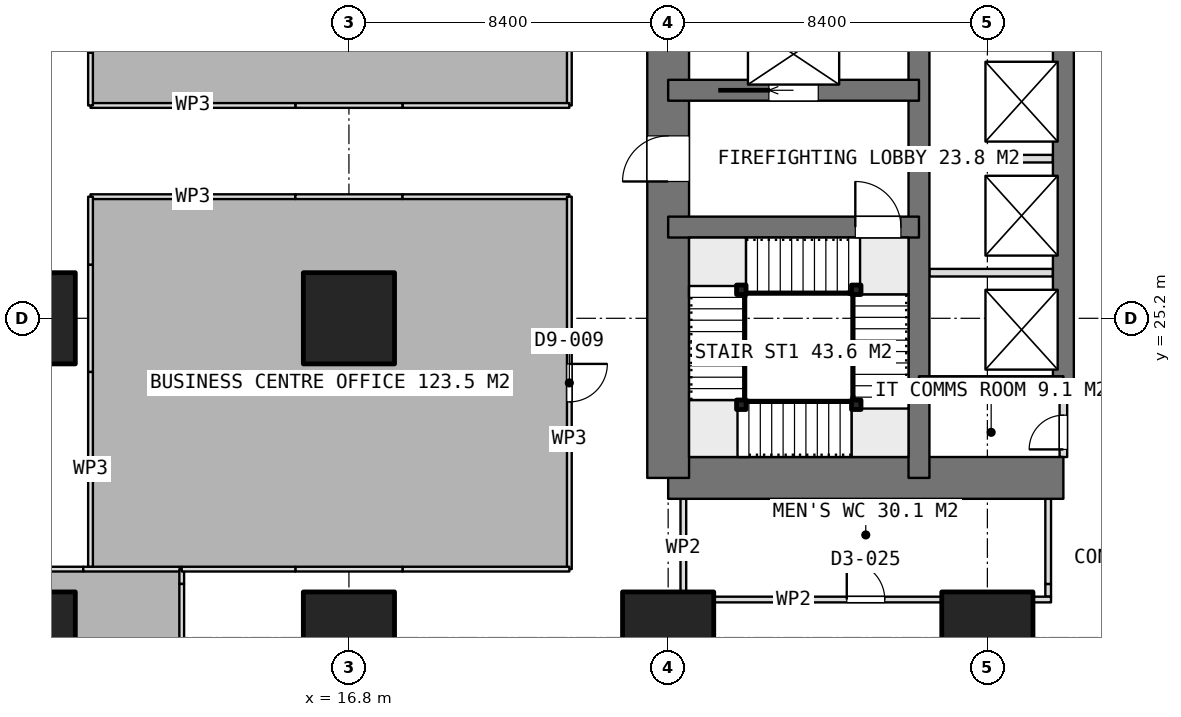
"""IFC4 building model, lengths in metres.
Left out: names, types, materials, properties, quantities, classifications, styles, units other than length and angle.
Written with IfcOpenShell. Run it as: python <this file> out.ifc"""

import sys

from ifc_helpers import new_model, si_unit, direction, frame, frame_2d, origin, origin_2d, place, context, subcontext, project, spatial, rectangle, extrude, element, fill, save


model = new_model("IFC4")
c1 = context("Model", 3, precision=1e-05, world=origin(), true_north=direction((0.0, 1.0)))
c2 = subcontext(c1, "Body", "Model", "MODEL_VIEW")
j1 = project(units=[si_unit("LENGTHUNIT", "METRE"), si_unit("PLANEANGLEUNIT", "RADIAN")], contexts=[c1])
p1 = place(None, origin())
s1 = spatial("IfcSite", under=j1, at=p1, CompositionType="ELEMENT")
p2 = place(p1, origin())
s2 = spatial("IfcBuilding", under=s1, at=p2, CompositionType="ELEMENT")
p3 = place(p2, frame((0.0, 0.0, 20.4)))
s3 = spatial("IfcBuildingStorey", under=s2, at=p3, CompositionType="ELEMENT", Elevation=20.4)
p4 = place(p3, frame((25.2, 21.0, 0.0), z_axis=(0.0, 0.0, 1.0), x_axis=(1.0, 0.0, 0.0)))
e1 = element("IfcWall", 1, at=p4, inside=s3, PredefinedType="SHEAR", context=c2, shape_type="SweptSolid", body=[
    extrude(rectangle(XDim=10.4, YDim=1.1, at=frame_2d((5.2, 0.0))), origin(), (0.0, 0.0, 1.0), 5.0),
])
p5 = place(p3, frame((25.2, 21.0, 0.0), z_axis=(0.0, 0.0, 1.0), x_axis=(0.0, 1.0, 0.0)))
e2 = element("IfcWall", 2, at=p5, inside=s3, PredefinedType="SHEAR", context=c2, shape_type="SweptSolid", body=[
    extrude(rectangle(XDim=25.2, YDim=1.1, at=frame_2d((12.6, 0.0))), origin(), (0.0, 0.0, 1.0), 5.0),
])
p6 = place(p5, frame((7.8, 0.0, 0.0)))
e3 = element("IfcOpeningElement", 3, at=p6, cuts=e2, PredefinedType="OPENING", context=c2, shape_type="SweptSolid", body=[
    extrude(rectangle(XDim=1.2, YDim=2.1, at=frame_2d((0.6, 1.05))), frame((0.0, 0.56, 0.0), z_axis=(0.0, -1.0, 0.0), x_axis=(1.0, 0.0, 0.0)), (0.0, 0.0, 1.0), 1.12),
])
p7 = place(p5, frame((14.25, 0.0, 0.0)))
e4 = element("IfcOpeningElement", 4, at=p7, cuts=e2, PredefinedType="OPENING", context=c2, shape_type="SweptSolid", body=[
    extrude(rectangle(XDim=0.9, YDim=2.1, at=frame_2d((0.45, 1.05))), frame((0.0, 0.56, 0.0), z_axis=(0.0, -1.0, 0.0), x_axis=(1.0, 0.0, 0.0)), (0.0, 0.0, 1.0), 1.12),
])
p8 = place(p5, frame((16.85, 0.0, 0.0)))
e5 = element("IfcOpeningElement", 5, at=p8, cuts=e2, PredefinedType="OPENING", context=c2, shape_type="SweptSolid", body=[
    extrude(rectangle(XDim=0.9, YDim=2.1, at=frame_2d((0.45, 1.05))), frame((0.0, 0.56, 0.0), z_axis=(0.0, -1.0, 0.0), x_axis=(1.0, 0.0, 0.0)), (0.0, 0.0, 1.0), 1.12),
])
p9 = place(p5, frame((19.075, 0.0, 0.0)))
e6 = element("IfcOpeningElement", 6, at=p9, cuts=e2, PredefinedType="OPENING", context=c2, shape_type="SweptSolid", body=[
    extrude(rectangle(XDim=1.2, YDim=2.1, at=frame_2d((0.6, 1.05))), frame((0.0, 0.56, 0.0), z_axis=(0.0, -1.0, 0.0), x_axis=(1.0, 0.0, 0.0)), (0.0, 0.0, 1.0), 1.12),
])
p10 = place(p3, frame((31.8, 21.0, 0.0), z_axis=(0.0, 0.0, 1.0), x_axis=(0.0, 1.0, 0.0)))
e7 = element("IfcWall", 7, at=p10, inside=s3, PredefinedType="SHEAR", context=c2, shape_type="SweptSolid", body=[
    extrude(rectangle(XDim=25.2, YDim=0.55, at=frame_2d((12.6, 0.0))), origin(), (0.0, 0.0, 1.0), 5.0),
])
p11 = place(p3, frame((35.6, 23.4, 0.0), z_axis=(0.0, 0.0, 1.0), x_axis=(0.0, 1.0, 0.0)))
e8 = element("IfcWall", 8, at=p11, inside=s3, PredefinedType="SHEAR", context=c2, shape_type="SweptSolid", body=[
    extrude(rectangle(XDim=18.0, YDim=0.55, at=frame_2d((9.0, 0.0))), origin(), (0.0, 0.0, 1.0), 5.0),
])
p12 = place(p3, frame((31.8, 23.4, 0.0), z_axis=(0.0, 0.0, 1.0), x_axis=(1.0, 0.0, 0.0)))
e9 = element("IfcWall", 9, at=p12, inside=s3, PredefinedType="SHEAR", context=c2, shape_type="SweptSolid", body=[
    extrude(rectangle(XDim=3.8, YDim=0.55, at=frame_2d((1.9, 0.0))), origin(), (0.0, 0.0, 1.0), 5.0),
])
p13 = place(p3, frame((25.2, 27.6, 0.0), z_axis=(0.0, 0.0, 1.0), x_axis=(1.0, 0.0, 0.0)))
e10 = element("IfcWall", 10, at=p13, inside=s3, PredefinedType="SHEAR", context=c2, shape_type="SweptSolid", body=[
    extrude(rectangle(XDim=6.6, YDim=0.55, at=frame_2d((3.3, 0.0))), origin(), (0.0, 0.0, 1.0), 5.0),
])
p14 = place(p13, frame((4.925, 0.0, 0.0)))
e11 = element("IfcOpeningElement", 11, at=p14, cuts=e10, PredefinedType="OPENING", context=c2, shape_type="SweptSolid", body=[
    extrude(rectangle(XDim=1.2, YDim=2.1, at=frame_2d((0.6, 1.05))), frame((0.0, 0.285, 0.0), z_axis=(0.0, -1.0, 0.0), x_axis=(1.0, 0.0, 0.0)), (0.0, 0.0, 1.0), 0.57),
])
p15 = place(p3, frame((25.2, 31.2, 0.0), z_axis=(0.0, 0.0, 1.0), x_axis=(1.0, 0.0, 0.0)))
e12 = element("IfcWall", 12, at=p15, inside=s3, PredefinedType="SHEAR", context=c2, shape_type="SweptSolid", body=[
    extrude(rectangle(XDim=6.6, YDim=0.55, at=frame_2d((3.3, 0.0))), origin(), (0.0, 0.0, 1.0), 5.0),
])
p16 = place(p15, frame((2.65, 0.0, 0.0)))
e13 = element("IfcOpeningElement", 13, at=p16, cuts=e12, PredefinedType="OPENING", context=c2, shape_type="SweptSolid", body=[
    extrude(rectangle(XDim=1.3, YDim=2.1, at=frame_2d((0.65, 1.05))), frame((0.0, 0.285, 0.0), z_axis=(0.0, -1.0, 0.0), x_axis=(1.0, 0.0, 0.0)), (0.0, 0.0, 1.0), 0.57),
])
for number, where, z_axis, x_axis in (
    (14, (8.4, 16.8, 0.0), (0.0, 0.0, 1.0), (1.0, 0.0, 0.0)),
    (15, (8.4, 25.2, 0.0), (0.0, 0.0, 1.0), (1.0, 0.0, 0.0)),
    (16, (16.8, 16.8, 0.0), (0.0, 0.0, 1.0), (1.0, 0.0, 0.0)),
    (17, (16.8, 25.2, 0.0), (0.0, 0.0, 1.0), (1.0, 0.0, 0.0)),
    (18, (25.2, 16.8, 0.0), (0.0, 0.0, 1.0), (1.0, 0.0, 0.0)),
    (19, (33.6, 16.8, 0.0), (0.0, 0.0, 1.0), (1.0, 0.0, 0.0)),
):
    element("IfcColumn", number, at=place(p3, frame(where, z_axis=z_axis, x_axis=x_axis)), inside=s3, PredefinedType="COLUMN", context=c2, shape_type="SweptSolid", body=[
        extrude(rectangle(XDim=2.4, YDim=2.4, at=origin_2d()), origin(), (0.0, 0.0, 1.0), 5.0),
    ])
for number, where, z_axis, x_axis in (
    (20, (32.075, 26.4, 0.0), (0.0, 0.0, 1.0), (1.0, 0.0, 0.0)),
    (21, (32.075, 29.4, 0.0), (0.0, 0.0, 1.0), (1.0, 0.0, 0.0)),
):
    element("IfcWall", number, at=place(p3, frame(where, z_axis=z_axis, x_axis=x_axis)), inside=s3, PredefinedType="PARTITIONING", context=c2, shape_type="SweptSolid", body=[
        extrude(rectangle(XDim=3.25, YDim=0.2, at=frame_2d((1.625, 0.0))), origin(), (0.0, 0.0, 1.0), 4.6),
    ])
p17 = place(p3, frame((35.6, 21.55, 0.0), z_axis=(0.0, 0.0, 1.0), x_axis=(0.0, 1.0, 0.0)))
e22 = element("IfcWall", 22, at=p17, inside=s3, PredefinedType="PARTITIONING", context=c2, shape_type="SweptSolid", body=[
    extrude(rectangle(XDim=1.575, YDim=0.2, at=frame_2d((0.788, 0.0))), origin(), (0.0, 0.0, 1.0), 4.6),
])
p18 = place(p17, frame((0.2, 0.0, 0.0)))
e23 = element("IfcOpeningElement", 23, at=p18, cuts=e22, PredefinedType="OPENING", context=c2, shape_type="SweptSolid", body=[
    extrude(rectangle(XDim=0.9, YDim=2.1, at=frame_2d((0.45, 1.05))), frame((0.0, 0.11, 0.0), z_axis=(0.0, -1.0, 0.0), x_axis=(1.0, 0.0, 0.0)), (0.0, 0.0, 1.0), 0.22),
])
p19 = place(p3, frame((25.525, 17.8, 0.0), z_axis=(0.0, 0.0, 1.0), x_axis=(1.0, 0.0, 0.0)))
e24 = element("IfcWall", 24, at=p19, inside=s3, PredefinedType="PARTITIONING", context=c2, shape_type="SweptSolid", body=[
    extrude(rectangle(XDim=0.875, YDim=0.15, at=frame_2d((0.438, 0.0))), origin(), (0.0, 0.0, 1.0), 4.6),
])
p20 = place(p3, frame((26.4, 17.8, 0.0), z_axis=(0.0, 0.0, 1.0), x_axis=(1.0, 0.0, 0.0)))
e25 = element("IfcWall", 25, at=p20, inside=s3, PredefinedType="PARTITIONING", context=c2, shape_type="SweptSolid", body=[
    extrude(rectangle(XDim=6.0, YDim=0.15, at=frame_2d((3.0, 0.0))), origin(), (0.0, 0.0, 1.0), 2.8),
])
p21 = place(p20, frame((3.5, 0.0, 0.0)))
e26 = element("IfcOpeningElement", 26, at=p21, cuts=e25, PredefinedType="OPENING", context=c2, shape_type="SweptSolid", body=[
    extrude(rectangle(XDim=1.0, YDim=2.1, at=frame_2d((0.5, 1.05))), frame((0.0, 0.085, 0.0), z_axis=(0.0, -1.0, 0.0), x_axis=(1.0, 0.0, 0.0)), (0.0, 0.0, 1.0), 0.17),
])
p22 = place(p3, frame((32.4, 17.8, 0.0), z_axis=(0.0, 0.0, 1.0), x_axis=(1.0, 0.0, 0.0)))
e27 = element("IfcWall", 27, at=p22, inside=s3, PredefinedType="PARTITIONING", context=c2, shape_type="SweptSolid", body=[
    extrude(rectangle(XDim=2.4, YDim=0.15, at=frame_2d((1.2, 0.0))), origin(), (0.0, 0.0, 1.0), 4.6),
])
p23 = place(p3, frame((34.8, 17.8, 0.0), z_axis=(0.0, 0.0, 1.0), x_axis=(1.0, 0.0, 0.0)))
e28 = element("IfcWall", 28, at=p23, inside=s3, PredefinedType="PARTITIONING", context=c2, shape_type="SweptSolid", body=[
    extrude(rectangle(XDim=0.475, YDim=0.15, at=frame_2d((0.237, 0.0))), origin(), (0.0, 0.0, 1.0), 2.8),
])
p24 = place(p3, frame((25.6, 17.875, 0.0), z_axis=(0.0, 0.0, 1.0), x_axis=(0.0, 1.0, 0.0)))
e29 = element("IfcWall", 29, at=p24, inside=s3, PredefinedType="PARTITIONING", context=c2, shape_type="SweptSolid", body=[
    extrude(rectangle(XDim=2.575, YDim=0.15, at=frame_2d((1.288, 0.0))), origin(), (0.0, 0.0, 1.0), 4.6),
])
p25 = place(p3, frame((35.2, 17.875, 0.0), z_axis=(0.0, 0.0, 1.0), x_axis=(0.0, 1.0, 0.0)))
e30 = element("IfcWall", 30, at=p25, inside=s3, PredefinedType="PARTITIONING", context=c2, shape_type="SweptSolid", body=[
    extrude(rectangle(XDim=0.335, YDim=0.15, at=frame_2d((0.167, 0.0))), origin(), (0.0, 0.0, 1.0), 2.8),
])
p26 = place(p3, frame((35.2, 18.21, 0.0), z_axis=(0.0, 0.0, 1.0), x_axis=(0.0, 1.0, 0.0)))
e31 = element("IfcWall", 31, at=p26, inside=s3, PredefinedType="PARTITIONING", context=c2, shape_type="SweptSolid", body=[
    extrude(rectangle(XDim=2.24, YDim=0.15, at=frame_2d((1.12, 0.0))), origin(), (0.0, 0.0, 1.0), 4.6),
])
p27 = place(p3, frame((6.99, 18.6, 0.0), z_axis=(0.0, 0.0, 1.0), x_axis=(1.0, 0.0, 0.0)))
e32 = element("IfcWall", 32, at=p27, inside=s3, PredefinedType="PARTITIONING", context=c2, shape_type="SweptSolid", body=[
    extrude(rectangle(XDim=2.82, YDim=0.125, at=frame_2d((1.41, 0.0))), origin(), (0.0, 0.0, 1.0), 2.8),
])
p28 = place(p3, frame((9.81, 18.6, 0.0), z_axis=(0.0, 0.0, 1.0), x_axis=(1.0, 0.0, 0.0)))
e33 = element("IfcWall", 33, at=p28, inside=s3, PredefinedType="PARTITIONING", context=c2, shape_type="SweptSolid", body=[
    extrude(rectangle(XDim=2.59, YDim=0.125, at=frame_2d((1.295, 0.0))), origin(), (0.0, 0.0, 1.0), 4.6),
])
p29 = place(p3, frame((12.4, 18.6, 0.0), z_axis=(0.0, 0.0, 1.0), x_axis=(0.0, -1.0, 0.0)))
e34 = element("IfcWall", 34, at=p29, inside=s3, PredefinedType="PARTITIONING", context=c2, shape_type="SweptSolid", body=[
    extrude(rectangle(XDim=0.39, YDim=0.125, at=frame_2d((0.195, 0.0))), origin(), (0.0, 0.0, 1.0), 4.6),
])
p30 = place(p3, frame((12.4, 18.21, 0.0), z_axis=(0.0, 0.0, 1.0), x_axis=(0.0, -1.0, 0.0)))
e35 = element("IfcWall", 35, at=p30, inside=s3, PredefinedType="PARTITIONING", context=c2, shape_type="SweptSolid", body=[
    extrude(rectangle(XDim=2.82, YDim=0.125, at=frame_2d((1.41, 0.0))), origin(), (0.0, 0.0, 1.0), 2.8),
])
p31 = place(p3, frame((10.0, 28.4, 0.0), z_axis=(0.0, 0.0, 1.0), x_axis=(1.0, 0.0, 0.0)))
e36 = element("IfcWall", 36, at=p31, inside=s3, PredefinedType="PARTITIONING", context=c2, shape_type="SweptSolid", body=[
    extrude(rectangle(XDim=5.39, YDim=0.125, at=frame_2d((2.695, 0.0))), origin(), (0.0, 0.0, 1.0), 4.6),
])
p32 = place(p3, frame((15.39, 28.4, 0.0), z_axis=(0.0, 0.0, 1.0), x_axis=(1.0, 0.0, 0.0)))
e37 = element("IfcWall", 37, at=p32, inside=s3, PredefinedType="PARTITIONING", context=c2, shape_type="SweptSolid", body=[
    extrude(rectangle(XDim=2.82, YDim=0.125, at=frame_2d((1.41, 0.0))), origin(), (0.0, 0.0, 1.0), 2.8),
])
p33 = place(p3, frame((18.21, 28.4, 0.0), z_axis=(0.0, 0.0, 1.0), x_axis=(1.0, 0.0, 0.0)))
e38 = element("IfcWall", 38, at=p33, inside=s3, PredefinedType="PARTITIONING", context=c2, shape_type="SweptSolid", body=[
    extrude(rectangle(XDim=4.39, YDim=0.125, at=frame_2d((2.195, 0.0))), origin(), (0.0, 0.0, 1.0), 4.6),
])
p34 = place(p3, frame((22.6, 28.4, 0.0), z_axis=(0.0, 0.0, 1.0), x_axis=(0.0, -1.0, 0.0)))
e39 = element("IfcWall", 39, at=p34, inside=s3, PredefinedType="PARTITIONING", context=c2, shape_type="SweptSolid", body=[
    extrude(rectangle(XDim=9.8, YDim=0.125, at=frame_2d((4.9, 0.0))), origin(), (0.0, 0.0, 1.0), 4.6),
])
p35 = place(p34, frame((4.4, 0.0, 0.0)))
e40 = element("IfcOpeningElement", 40, at=p35, cuts=e39, PredefinedType="OPENING", context=c2, shape_type="SweptSolid", body=[
    extrude(rectangle(XDim=1.0, YDim=2.1, at=frame_2d((0.5, 1.05))), frame((0.0, 0.073, 0.0), z_axis=(0.0, -1.0, 0.0), x_axis=(1.0, 0.0, 0.0)), (0.0, 0.0, 1.0), 0.145),
])
p36 = place(p3, frame((22.6, 18.6, 0.0), z_axis=(0.0, 0.0, 1.0), x_axis=(-1.0, 0.0, 0.0)))
e41 = element("IfcWall", 41, at=p36, inside=s3, PredefinedType="PARTITIONING", context=c2, shape_type="SweptSolid", body=[
    extrude(rectangle(XDim=4.39, YDim=0.125, at=frame_2d((2.195, 0.0))), origin(), (0.0, 0.0, 1.0), 4.6),
])
p37 = place(p3, frame((18.21, 18.6, 0.0), z_axis=(0.0, 0.0, 1.0), x_axis=(-1.0, 0.0, 0.0)))
e42 = element("IfcWall", 42, at=p37, inside=s3, PredefinedType="PARTITIONING", context=c2, shape_type="SweptSolid", body=[
    extrude(rectangle(XDim=2.82, YDim=0.125, at=frame_2d((1.41, 0.0))), origin(), (0.0, 0.0, 1.0), 2.8),
])
p38 = place(p3, frame((15.39, 18.6, 0.0), z_axis=(0.0, 0.0, 1.0), x_axis=(-1.0, 0.0, 0.0)))
e43 = element("IfcWall", 43, at=p38, inside=s3, PredefinedType="PARTITIONING", context=c2, shape_type="SweptSolid", body=[
    extrude(rectangle(XDim=2.99, YDim=0.125, at=frame_2d((1.495, 0.0))), origin(), (0.0, 0.0, 1.0), 4.6),
])
p39 = place(p3, frame((10.0, 18.663, 0.0), z_axis=(0.0, 0.0, 1.0), x_axis=(0.0, 1.0, 0.0)))
e44 = element("IfcWall", 44, at=p39, inside=s3, PredefinedType="PARTITIONING", context=c2, shape_type="SweptSolid", body=[
    extrude(rectangle(XDim=5.127, YDim=0.125, at=frame_2d((2.563, 0.0))), origin(), (0.0, 0.0, 1.0), 4.6),
])
p40 = place(p3, frame((10.0, 23.79, 0.0), z_axis=(0.0, 0.0, 1.0), x_axis=(0.0, 1.0, 0.0)))
e45 = element("IfcWall", 45, at=p40, inside=s3, PredefinedType="PARTITIONING", context=c2, shape_type="SweptSolid", body=[
    extrude(rectangle(XDim=2.82, YDim=0.125, at=frame_2d((1.41, 0.0))), origin(), (0.0, 0.0, 1.0), 2.8),
])
p41 = place(p3, frame((10.0, 26.61, 0.0), z_axis=(0.0, 0.0, 1.0), x_axis=(0.0, 1.0, 0.0)))
e46 = element("IfcWall", 46, at=p41, inside=s3, PredefinedType="PARTITIONING", context=c2, shape_type="SweptSolid", body=[
    extrude(rectangle(XDim=1.79, YDim=0.125, at=frame_2d((0.895, 0.0))), origin(), (0.0, 0.0, 1.0), 4.6),
])
p42 = place(p3, frame((22.6, 40.6, 0.0), z_axis=(0.0, 0.0, 1.0), x_axis=(0.0, -1.0, 0.0)))
e47 = element("IfcWall", 47, at=p42, inside=s3, PredefinedType="PARTITIONING", context=c2, shape_type="SweptSolid", body=[
    extrude(rectangle(XDim=9.8, YDim=0.125, at=frame_2d((4.9, 0.0))), origin(), (0.0, 0.0, 1.0), 4.6),
])
p43 = place(p42, frame((5.5, 0.0, 0.0)))
e48 = element("IfcOpeningElement", 48, at=p43, cuts=e47, PredefinedType="OPENING", context=c2, shape_type="SweptSolid", body=[
    extrude(rectangle(XDim=1.0, YDim=2.1, at=frame_2d((0.5, 1.05))), frame((0.0, 0.073, 0.0), z_axis=(0.0, -1.0, 0.0), x_axis=(1.0, 0.0, 0.0)), (0.0, 0.0, 1.0), 0.145),
])
p44 = place(p3, frame((22.6, 30.8, 0.0), z_axis=(0.0, 0.0, 1.0), x_axis=(-1.0, 0.0, 0.0)))
e49 = element("IfcWall", 49, at=p44, inside=s3, PredefinedType="PARTITIONING", context=c2, shape_type="SweptSolid", body=[
    extrude(rectangle(XDim=4.39, YDim=0.125, at=frame_2d((2.195, 0.0))), origin(), (0.0, 0.0, 1.0), 4.6),
])
p45 = place(p3, frame((18.21, 30.8, 0.0), z_axis=(0.0, 0.0, 1.0), x_axis=(-1.0, 0.0, 0.0)))
e50 = element("IfcWall", 50, at=p45, inside=s3, PredefinedType="PARTITIONING", context=c2, shape_type="SweptSolid", body=[
    extrude(rectangle(XDim=2.82, YDim=0.125, at=frame_2d((1.41, 0.0))), origin(), (0.0, 0.0, 1.0), 2.8),
])
p46 = place(p3, frame((15.39, 30.8, 0.0), z_axis=(0.0, 0.0, 1.0), x_axis=(-1.0, 0.0, 0.0)))
e51 = element("IfcWall", 51, at=p46, inside=s3, PredefinedType="PARTITIONING", context=c2, shape_type="SweptSolid", body=[
    extrude(rectangle(XDim=5.39, YDim=0.125, at=frame_2d((2.695, 0.0))), origin(), (0.0, 0.0, 1.0), 4.6),
])
p47 = place(p3, frame((10.0, 30.8, 0.0), z_axis=(0.0, 0.0, 1.0), x_axis=(0.0, 1.0, 0.0)))
e52 = element("IfcWall", 52, at=p47, inside=s3, PredefinedType="PARTITIONING", context=c2, shape_type="SweptSolid", body=[
    extrude(rectangle(XDim=1.39, YDim=0.125, at=frame_2d((0.695, 0.0))), origin(), (0.0, 0.0, 1.0), 4.6),
])
p48 = place(p3, frame((10.0, 32.19, 0.0), z_axis=(0.0, 0.0, 1.0), x_axis=(0.0, 1.0, 0.0)))
e53 = element("IfcWall", 53, at=p48, inside=s3, PredefinedType="PARTITIONING", context=c2, shape_type="SweptSolid", body=[
    extrude(rectangle(XDim=2.82, YDim=0.125, at=frame_2d((1.41, 0.0))), origin(), (0.0, 0.0, 1.0), 2.8),
])
for number, where, z_axis, x_axis in (
    (54, (30.15, 25.95, 0.0), (0.0, 0.0, 1.0), (1.0, 0.0, 0.0)),
    (55, (30.15, 22.925, 0.0), (0.0, 0.0, 1.0), (1.0, 0.0, 0.0)),
    (56, (27.125, 22.925, 0.0), (0.0, 0.0, 1.0), (1.0, 0.0, 0.0)),
    (57, (27.125, 25.95, 0.0), (0.0, 0.0, 1.0), (1.0, 0.0, 0.0)),
):
    element("IfcColumn", number, at=place(p3, frame(where, z_axis=z_axis, x_axis=x_axis)), inside=s3, PredefinedType="COLUMN", context=c2, shape_type="SweptSolid", body=[
        extrude(rectangle(XDim=0.25, YDim=0.25, at=origin_2d()), origin(), (0.0, 0.0, 1.0), 5.0),
    ])
p49 = place(p6, origin())
e58 = element("IfcDoor", 58, at=p49, inside=s3, OperationType="SINGLE_SWING_LEFT", PredefinedType="DOOR", context=c2, shape_type="SweptSolid", body=[
    extrude(rectangle(XDim=1.2, YDim=2.1, at=frame_2d((0.6, 1.05))), frame((0.0, 0.025, 0.0), z_axis=(0.0, -1.0, 0.0), x_axis=(1.0, 0.0, 0.0)), (0.0, 0.0, 1.0), 0.05),
])
fill(e3, e58)
p50 = place(p18, origin())
e59 = element("IfcDoor", 59, at=p50, inside=s3, OperationType="SINGLE_SWING_LEFT", PredefinedType="DOOR", context=c2, shape_type="SweptSolid", body=[
    extrude(rectangle(XDim=0.9, YDim=2.1, at=frame_2d((0.45, 1.05))), frame((0.0, 0.025, 0.0), z_axis=(0.0, -1.0, 0.0), x_axis=(1.0, 0.0, 0.0)), (0.0, 0.0, 1.0), 0.05),
])
fill(e23, e59)
p51 = place(p16, origin())
e60 = element("IfcDoor", 60, at=p51, inside=s3, OperationType="SLIDING_TO_LEFT", PredefinedType="USERDEFINED", context=c2, shape_type="SweptSolid", body=[
    extrude(rectangle(XDim=1.3, YDim=2.1, at=frame_2d((0.65, 1.05))), frame((0.0, 0.025, 0.0), z_axis=(0.0, -1.0, 0.0), x_axis=(1.0, 0.0, 0.0)), (0.0, 0.0, 1.0), 0.05),
])
fill(e13, e60)
p52 = place(p21, origin())
e61 = element("IfcDoor", 61, at=p52, inside=s3, OperationType="SINGLE_SWING_LEFT", PredefinedType="DOOR", context=c2, shape_type="SweptSolid", body=[
    extrude(rectangle(XDim=1.0, YDim=2.1, at=frame_2d((0.5, 1.05))), frame((0.0, 0.025, 0.0), z_axis=(0.0, -1.0, 0.0), x_axis=(1.0, 0.0, 0.0)), (0.0, 0.0, 1.0), 0.05),
])
fill(e26, e61)
p53 = place(p35, origin())
e62 = element("IfcDoor", 62, at=p53, inside=s3, OperationType="SINGLE_SWING_LEFT", PredefinedType="DOOR", context=c2, shape_type="SweptSolid", body=[
    extrude(rectangle(XDim=1.0, YDim=2.1, at=frame_2d((0.5, 1.05))), frame((0.0, 0.025, 0.0), z_axis=(0.0, -1.0, 0.0), x_axis=(1.0, 0.0, 0.0)), (0.0, 0.0, 1.0), 0.05),
])
fill(e40, e62)
p54 = place(p14, origin())
e63 = element("IfcDoor", 63, at=p54, inside=s3, OperationType="SINGLE_SWING_RIGHT", PredefinedType="DOOR", context=c2, shape_type="SweptSolid", body=[
    extrude(rectangle(XDim=1.2, YDim=2.1, at=frame_2d((0.6, 1.05))), frame((0.0, 0.025, 0.0), z_axis=(0.0, -1.0, 0.0), x_axis=(1.0, 0.0, 0.0)), (0.0, 0.0, 1.0), 0.05),
])
fill(e11, e63)
save(model, sys.argv[1])
